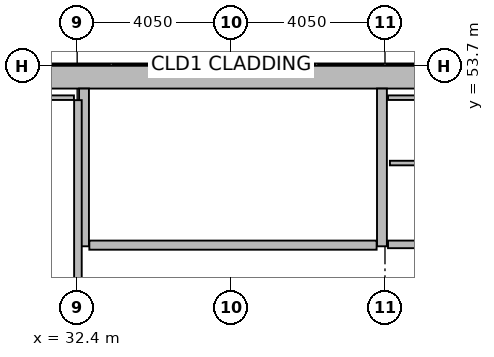
"""IFC4 building model, lengths in metres.
Left out: names, types, materials, properties, quantities, classifications, styles, units other than length and angle.
Written with IfcOpenShell. Run it as: python <this file> out.ifc"""

import sys

from ifc_helpers import new_model, si_unit, direction, frame, frame_2d, origin, place, context, subcontext, project, spatial, rectangle, extrude, element, fill, save


model = new_model("IFC4")
c1 = context("Model", 3, precision=1e-05, world=origin(), true_north=direction((0.0, 1.0)))
c2 = subcontext(c1, "Body", "Model", "MODEL_VIEW")
j1 = project(units=[si_unit("LENGTHUNIT", "METRE"), si_unit("PLANEANGLEUNIT", "RADIAN")], contexts=[c1])
p1 = place(None, origin())
s1 = spatial("IfcSite", under=j1, at=p1, CompositionType="ELEMENT")
p2 = place(p1, origin())
s2 = spatial("IfcBuilding", under=s1, at=p2, CompositionType="ELEMENT")
p3 = place(p2, frame((0.0, 0.0, 184.2)))
s3 = spatial("IfcBuildingStorey", under=s2, at=p3, CompositionType="ELEMENT", Elevation=184.2)
p4 = place(p3, frame((16.2, 53.4, 0.0), z_axis=(0.0, 0.0, 1.0), x_axis=(1.0, 0.0, 0.0)))
e1 = element("IfcWall", 1, at=p4, inside=s3, PredefinedType="SHEAR", context=c2, shape_type="SweptSolid", body=[
    extrude(rectangle(XDim=40.5, YDim=0.6, at=frame_2d((20.25, 0.0))), origin(), (0.0, 0.0, 1.0), 4.24),
])
for number, where, z_axis, x_axis in (
    (2, (32.58, 48.95, 0.0), (0.0, 0.0, 1.0), (0.0, 1.0, 0.0)),
    (3, (40.42, 48.95, 0.0), (0.0, 0.0, 1.0), (0.0, 1.0, 0.0)),
):
    element("IfcWall", number, at=place(p3, frame(where, z_axis=z_axis, x_axis=x_axis)), inside=s3, PredefinedType="SHEAR", context=c2, shape_type="SweptSolid", body=[
        extrude(rectangle(XDim=4.15, YDim=0.26, at=frame_2d((2.075, 0.0))), origin(), (0.0, 0.0, 1.0), 4.24),
    ])
p5 = place(p3, frame((32.72, 48.98, 0.0), z_axis=(0.0, 0.0, 1.0), x_axis=(1.0, 0.0, 0.0)))
e4 = element("IfcWall", 4, at=p5, inside=s3, PredefinedType="SHEAR", context=c2, shape_type="SweptSolid", body=[
    extrude(rectangle(XDim=7.56, YDim=0.24, at=frame_2d((3.78, 0.0))), origin(), (0.0, 0.0, 1.0), 4.24),
])
p6 = place(p5, frame((0.22, 0.0, 0.0)))
e5 = element("IfcOpeningElement", 5, at=p6, cuts=e4, PredefinedType="OPENING", context=c2, shape_type="SweptSolid", body=[
    extrude(rectangle(XDim=1.05, YDim=2.15, at=frame_2d((0.525, 1.075))), frame((0.0, 0.13, 0.0), z_axis=(0.0, -1.0, 0.0), x_axis=(1.0, 0.0, 0.0)), (0.0, 0.0, 1.0), 0.26),
])
p7 = place(p3, frame((32.42, 46.805, 0.0), z_axis=(0.0, 0.0, 1.0), x_axis=(0.0, 1.0, 0.0)))
e6 = element("IfcWall", 6, at=p7, inside=s3, PredefinedType="PARTITIONING", context=c2, shape_type="SweptSolid", body=[
    extrude(rectangle(XDim=5.99, YDim=0.2, at=frame_2d((2.995, 0.0))), origin(), (0.0, 0.0, 1.0), 4.24),
])
p8 = place(p3, frame((24.805, 52.86, 0.0), z_axis=(0.0, 0.0, 1.0), x_axis=(1.0, 0.0, 0.0)))
e7 = element("IfcWall", 7, at=p8, inside=s3, PredefinedType="PARTITIONING", context=c2, shape_type="SweptSolid", body=[
    extrude(rectangle(XDim=7.51, YDim=0.12, at=frame_2d((3.755, 0.0))), origin(), (0.0, 0.0, 1.0), 4.24),
])
p9 = place(p3, frame((40.58, 52.86, 0.0), z_axis=(0.0, 0.0, 1.0), x_axis=(1.0, 0.0, 0.0)))
e8 = element("IfcWall", 8, at=p9, inside=s3, PredefinedType="PARTITIONING", context=c2, shape_type="SweptSolid", body=[
    extrude(rectangle(XDim=7.56, YDim=0.12, at=frame_2d((3.78, 0.0))), origin(), (0.0, 0.0, 1.0), 4.24),
])
p10 = place(p3, frame((40.58, 49.0, 0.0), z_axis=(0.0, 0.0, 1.0), x_axis=(1.0, 0.0, 0.0)))
e9 = element("IfcWall", 9, at=p10, inside=s3, PredefinedType="PARTITIONING", context=c2, shape_type="SweptSolid", body=[
    extrude(rectangle(XDim=7.56, YDim=0.2, at=frame_2d((3.78, 0.0))), origin(), (0.0, 0.0, 1.0), 4.24),
])
p11 = place(p10, frame((0.16, 0.0, 0.0)))
e10 = element("IfcOpeningElement", 10, at=p11, cuts=e9, PredefinedType="OPENING", context=c2, shape_type="SweptSolid", body=[
    extrude(rectangle(XDim=0.95, YDim=2.1, at=frame_2d((0.475, 1.05))), frame((0.0, 0.11, 0.0), z_axis=(0.0, -1.0, 0.0), x_axis=(1.0, 0.0, 0.0)), (0.0, 0.0, 1.0), 0.22),
])
p12 = place(p3, frame((40.63, 51.14, 0.0), z_axis=(0.0, 0.0, 1.0), x_axis=(1.0, 0.0, 0.0)))
e11 = element("IfcWall", 11, at=p12, inside=s3, PredefinedType="PARTITIONING", context=c2, shape_type="SweptSolid", body=[
    extrude(rectangle(XDim=7.46, YDim=0.12, at=frame_2d((3.73, 0.0))), origin(), (0.0, 0.0, 1.0), 4.24),
])
p13 = place(p12, frame((2.4, 0.0, 0.0)))
e12 = element("IfcOpeningElement", 12, at=p13, cuts=e11, PredefinedType="OPENING", context=c2, shape_type="SweptSolid", body=[
    extrude(rectangle(XDim=0.9, YDim=2.05, at=frame_2d((0.45, 1.025))), frame((0.0, 0.07, 0.0), z_axis=(0.0, -1.0, 0.0), x_axis=(1.0, 0.0, 0.0)), (0.0, 0.0, 1.0), 0.14),
])
p14 = place(p6, origin())
e13 = element("IfcDoor", 13, at=p14, inside=s3, OperationType="SINGLE_SWING_LEFT", PredefinedType="DOOR", context=c2, shape_type="SweptSolid", body=[
    extrude(rectangle(XDim=1.05, YDim=2.15, at=frame_2d((0.525, 1.075))), frame((0.0, 0.025, 0.0), z_axis=(0.0, -1.0, 0.0), x_axis=(1.0, 0.0, 0.0)), (0.0, 0.0, 1.0), 0.05),
])
fill(e5, e13)
p15 = place(p11, origin())
e14 = element("IfcDoor", 14, at=p15, inside=s3, OperationType="SINGLE_SWING_RIGHT", PredefinedType="DOOR", context=c2, shape_type="SweptSolid", body=[
    extrude(rectangle(XDim=0.95, YDim=2.1, at=frame_2d((0.475, 1.05))), frame((0.0, 0.025, 0.0), z_axis=(0.0, -1.0, 0.0), x_axis=(1.0, 0.0, 0.0)), (0.0, 0.0, 1.0), 0.05),
])
fill(e10, e14)
save(model, sys.argv[1])
